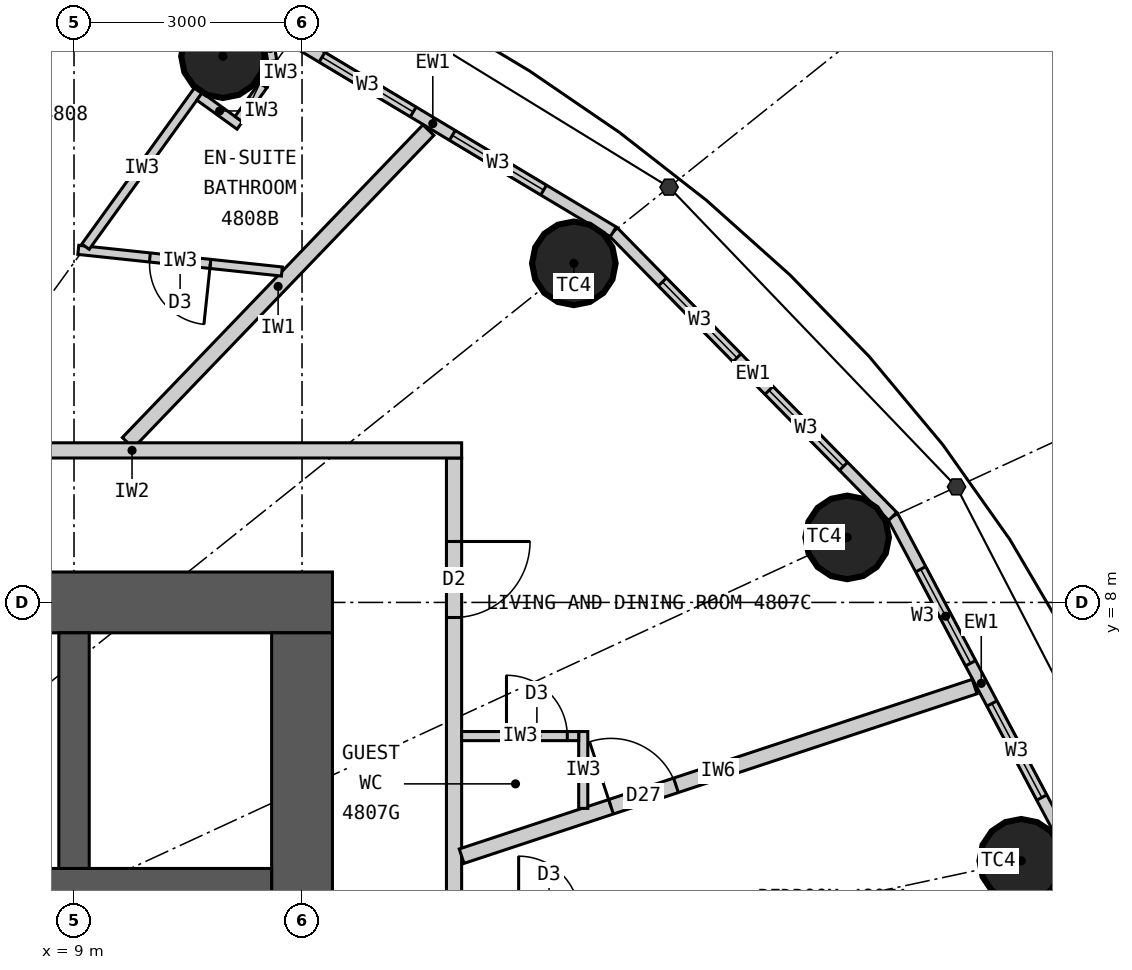
"""IFC4 building model, lengths in metres.
Left out: names, types, materials, properties, quantities, classifications, styles, units other than length and angle.
Written with IfcOpenShell. Run it as: python <this file> out.ifc"""

import sys

from ifc_helpers import new_model, si_unit, direction, frame, frame_2d, origin, origin_2d, place, context, subcontext, project, spatial, rectangle, circle, extrude, element, fill, save


model = new_model("IFC4")
c1 = context("Model", 3, precision=1e-05, world=origin(), true_north=direction((0.0, 1.0)))
c2 = subcontext(c1, "Body", "Model", "MODEL_VIEW")
j1 = project(units=[si_unit("LENGTHUNIT", "METRE"), si_unit("PLANEANGLEUNIT", "RADIAN")], contexts=[c1])
p1 = place(None, origin())
s1 = spatial("IfcSite", under=j1, at=p1, CompositionType="ELEMENT")
p2 = place(p1, origin())
s2 = spatial("IfcBuilding", under=s1, at=p2, CompositionType="ELEMENT")
p3 = place(p2, frame((0.0, 0.0, 179.7)))
s3 = spatial("IfcBuildingStorey", under=s2, at=p3, CompositionType="ELEMENT", Elevation=179.7)
for number, where, z_axis, x_axis in (
    (1, (21.463, 4.601, 0.0), (0.0, 0.0, 1.0), (1.0, 0.0, 0.0)),
    (2, (19.172, 8.855, 0.0), (0.0, 0.0, 1.0), (1.0, 0.0, 0.0)),
    (3, (15.576, 12.461, 0.0), (0.0, 0.0, 1.0), (1.0, 0.0, 0.0)),
    (4, (10.96, 15.186, 0.0), (0.0, 0.0, 1.0), (1.0, 0.0, 0.0)),
):
    element("IfcColumn", number, at=place(p3, frame(where, z_axis=z_axis, x_axis=x_axis)), inside=s3, PredefinedType="COLUMN", context=c2, shape_type="SweptSolid", body=[
        extrude(circle(Radius=0.55, at=origin_2d()), origin(), (0.0, 0.0, 1.0), 3.3),
    ])
p4 = place(p3, frame((-12.4, 8.0, 0.0), z_axis=(0.0, 0.0, 1.0), x_axis=(1.0, 0.0, 0.0)))
e5 = element("IfcWall", 5, at=p4, inside=s3, PredefinedType="SHEAR", context=c2, shape_type="SweptSolid", body=[
    extrude(rectangle(XDim=24.8, YDim=0.8, at=frame_2d((12.4, 0.0))), origin(), (0.0, 0.0, 1.0), 3.3),
])
p5 = place(p4, frame((11.1, 0.0, 0.0)))
e6 = element("IfcOpeningElement", 6, at=p5, cuts=e5, PredefinedType="OPENING", context=c2, shape_type="SweptSolid", body=[
    extrude(rectangle(XDim=1.2, YDim=2.2, at=frame_2d((0.6, 1.1))), frame((0.0, 0.41, 0.0), z_axis=(0.0, -1.0, 0.0), x_axis=(1.0, 0.0, 0.0)), (0.0, 0.0, 1.0), 0.82),
])
p6 = place(p4, frame((18.7, 0.0, 0.0)))
e7 = element("IfcOpeningElement", 7, at=p6, cuts=e5, PredefinedType="OPENING", context=c2, shape_type="SweptSolid", body=[
    extrude(rectangle(XDim=0.9, YDim=2.2, at=frame_2d((0.45, 1.1))), frame((0.0, 0.41, 0.0), z_axis=(0.0, -1.0, 0.0), x_axis=(1.0, 0.0, 0.0)), (0.0, 0.0, 1.0), 0.82),
])
p7 = place(p3, frame((12.0, -7.6, 0.0), z_axis=(0.0, 0.0, 1.0), x_axis=(0.0, 1.0, 0.0)))
e8 = element("IfcWall", 8, at=p7, inside=s3, PredefinedType="SHEAR", context=c2, shape_type="SweptSolid", body=[
    extrude(rectangle(XDim=15.2, YDim=0.8, at=frame_2d((7.6, 0.0))), origin(), (0.0, 0.0, 1.0), 3.3),
])
p8 = place(p7, frame((6.7, 0.0, 0.0)))
e9 = element("IfcOpeningElement", 9, at=p8, cuts=e8, PredefinedType="OPENING", context=c2, shape_type="SweptSolid", body=[
    extrude(rectangle(XDim=1.8, YDim=2.2, at=frame_2d((0.9, 1.1))), frame((0.0, 0.41, 0.0), z_axis=(0.0, -1.0, 0.0), x_axis=(1.0, 0.0, 0.0)), (0.0, 0.0, 1.0), 0.82),
])
p9 = place(p3, frame((-11.6, 4.3, 0.0), z_axis=(0.0, 0.0, 1.0), x_axis=(1.0, 0.0, 0.0)))
e10 = element("IfcWall", 10, at=p9, inside=s3, PredefinedType="SHEAR", context=c2, shape_type="SweptSolid", body=[
    extrude(rectangle(XDim=23.2, YDim=0.4, at=frame_2d((11.6, 0.0))), origin(), (0.0, 0.0, 1.0), 3.3),
])
p10 = place(p3, frame((9.0, 4.5, 0.0), z_axis=(0.0, 0.0, 1.0), x_axis=(0.0, 1.0, 0.0)))
e11 = element("IfcWall", 11, at=p10, inside=s3, PredefinedType="SHEAR", context=c2, shape_type="SweptSolid", body=[
    extrude(rectangle(XDim=3.1, YDim=0.4, at=frame_2d((1.55, 0.0))), origin(), (0.0, 0.0, 1.0), 3.3),
])
p11 = place(p3, frame((22.102, 4.738, 0.0), z_axis=(0.0, 0.0, 1.0), x_axis=(-0.468428906714, 0.883501193748, 0.0)))
e12 = element("IfcWall", 12, at=p11, inside=s3, PredefinedType="ELEMENTEDWALL", context=c2, shape_type="SweptSolid", body=[
    extrude(rectangle(XDim=4.974, YDim=0.15, at=frame_2d((2.487, 0.0))), origin(), (0.0, 0.0, 1.0), 3.12),
])
p12 = place(p11, frame((0.787, 0.0, 0.9)))
e13 = element("IfcOpeningElement", 13, at=p12, cuts=e12, PredefinedType="OPENING", context=c2, shape_type="SweptSolid", body=[
    extrude(rectangle(XDim=1.4, YDim=1.9, at=frame_2d((0.7, 0.95))), frame((0.0, 0.085, 0.0), z_axis=(0.0, -1.0, 0.0), x_axis=(1.0, 0.0, 0.0)), (0.0, 0.0, 1.0), 0.17),
])
p13 = place(p11, frame((2.787, 0.0, 0.9)))
e14 = element("IfcOpeningElement", 14, at=p13, cuts=e12, PredefinedType="OPENING", context=c2, shape_type="SweptSolid", body=[
    extrude(rectangle(XDim=1.4, YDim=1.9, at=frame_2d((0.7, 0.95))), frame((0.0, 0.085, 0.0), z_axis=(0.0, -1.0, 0.0), x_axis=(1.0, 0.0, 0.0)), (0.0, 0.0, 1.0), 0.17),
])
p14 = place(p3, frame((19.772, 9.132, 0.0), z_axis=(0.0, 0.0, 1.0), x_axis=(-0.700727467776, 0.71342905457, 0.0)))
e15 = element("IfcWall", 15, at=p14, inside=s3, PredefinedType="ELEMENTEDWALL", context=c2, shape_type="SweptSolid", body=[
    extrude(rectangle(XDim=5.247, YDim=0.15, at=frame_2d((2.624, 0.0))), origin(), (0.0, 0.0, 1.0), 3.12),
])
p15 = place(p14, frame((0.924, 0.0, 0.9)))
e16 = element("IfcOpeningElement", 16, at=p15, cuts=e15, PredefinedType="OPENING", context=c2, shape_type="SweptSolid", body=[
    extrude(rectangle(XDim=1.4, YDim=1.9, at=frame_2d((0.7, 0.95))), frame((0.0, 0.085, 0.0), z_axis=(0.0, -1.0, 0.0), x_axis=(1.0, 0.0, 0.0)), (0.0, 0.0, 1.0), 0.17),
])
p16 = place(p14, frame((2.924, 0.0, 0.9)))
e17 = element("IfcOpeningElement", 17, at=p16, cuts=e15, PredefinedType="OPENING", context=c2, shape_type="SweptSolid", body=[
    extrude(rectangle(XDim=1.4, YDim=1.9, at=frame_2d((0.7, 0.95))), frame((0.0, 0.085, 0.0), z_axis=(0.0, -1.0, 0.0), x_axis=(1.0, 0.0, 0.0)), (0.0, 0.0, 1.0), 0.17),
])
p17 = place(p3, frame((16.095, 12.876, 0.0), z_axis=(0.0, 0.0, 1.0), x_axis=(-0.857695199231, 0.514158482587, 0.0)))
e18 = element("IfcWall", 18, at=p17, inside=s3, PredefinedType="ELEMENTEDWALL", context=c2, shape_type="SweptSolid", body=[
    extrude(rectangle(XDim=5.536, YDim=0.15, at=frame_2d((2.768, 0.0))), origin(), (0.0, 0.0, 1.0), 3.12),
])
p18 = place(p17, frame((1.068, 0.0, 0.9)))
e19 = element("IfcOpeningElement", 19, at=p18, cuts=e18, PredefinedType="OPENING", context=c2, shape_type="SweptSolid", body=[
    extrude(rectangle(XDim=1.4, YDim=1.9, at=frame_2d((0.7, 0.95))), frame((0.0, 0.085, 0.0), z_axis=(0.0, -1.0, 0.0), x_axis=(1.0, 0.0, 0.0)), (0.0, 0.0, 1.0), 0.17),
])
p19 = place(p17, frame((3.068, 0.0, 0.9)))
e20 = element("IfcOpeningElement", 20, at=p19, cuts=e18, PredefinedType="OPENING", context=c2, shape_type="SweptSolid", body=[
    extrude(rectangle(XDim=1.4, YDim=1.9, at=frame_2d((0.7, 0.95))), frame((0.0, 0.085, 0.0), z_axis=(0.0, -1.0, 0.0), x_axis=(1.0, 0.0, 0.0)), (0.0, 0.0, 1.0), 0.17),
])
p20 = place(p3, frame((14.0, -9.9, 0.0), z_axis=(0.0, 0.0, 1.0), x_axis=(0.0, 1.0, 0.0)))
e21 = element("IfcWall", 21, at=p20, inside=s3, PredefinedType="PARTITIONING", context=c2, shape_type="SweptSolid", body=[
    extrude(rectangle(XDim=19.8, YDim=0.2, at=frame_2d((9.9, 0.0))), origin(), (0.0, 0.0, 1.0), 3.12),
])
p21 = place(p20, frame((4.268, 0.0, 0.0)))
e22 = element("IfcOpeningElement", 22, at=p21, cuts=e21, PredefinedType="OPENING", context=c2, shape_type="SweptSolid", body=[
    extrude(rectangle(XDim=1.0, YDim=2.2, at=frame_2d((0.5, 1.1))), frame((0.0, 0.11, 0.0), z_axis=(0.0, -1.0, 0.0), x_axis=(1.0, 0.0, 0.0)), (0.0, 0.0, 1.0), 0.22),
])
p22 = place(p20, frame((7.177, 0.0, 0.0)))
e23 = element("IfcOpeningElement", 23, at=p22, cuts=e21, PredefinedType="OPENING", context=c2, shape_type="SweptSolid", body=[
    extrude(rectangle(XDim=1.0, YDim=2.2, at=frame_2d((0.5, 1.1))), frame((0.0, 0.11, 0.0), z_axis=(0.0, -1.0, 0.0), x_axis=(1.0, 0.0, 0.0)), (0.0, 0.0, 1.0), 0.22),
])
p23 = place(p20, frame((17.701, 0.0, 0.0)))
e24 = element("IfcOpeningElement", 24, at=p23, cuts=e21, PredefinedType="OPENING", context=c2, shape_type="SweptSolid", body=[
    extrude(rectangle(XDim=1.0, YDim=2.2, at=frame_2d((0.5, 1.1))), frame((0.0, 0.11, 0.0), z_axis=(0.0, -1.0, 0.0), x_axis=(1.0, 0.0, 0.0)), (0.0, 0.0, 1.0), 0.22),
])
p24 = place(p3, frame((14.1, 4.661, 0.0), z_axis=(0.0, 0.0, 1.0), x_axis=(0.949453216399, 0.313908569285, 0.0)))
e25 = element("IfcWall", 25, at=p24, inside=s3, PredefinedType="PARTITIONING", context=c2, shape_type="SweptSolid", body=[
    extrude(rectangle(XDim=7.109, YDim=0.2, at=frame_2d((3.554, 0.0))), origin(), (0.0, 0.0, 1.0), 3.12),
])
p25 = place(p24, frame((2.07, 0.0, 0.0)))
e26 = element("IfcOpeningElement", 26, at=p25, cuts=e25, PredefinedType="OPENING", context=c2, shape_type="SweptSolid", body=[
    extrude(rectangle(XDim=0.9, YDim=2.1, at=frame_2d((0.45, 1.05))), frame((0.0, 0.11, 0.0), z_axis=(0.0, -1.0, 0.0), x_axis=(1.0, 0.0, 0.0)), (0.0, 0.0, 1.0), 0.22),
])
p26 = place(p3, frame((9.708, 10.1, 0.0), z_axis=(0.0, 0.0, 1.0), x_axis=(0.692978748441, 0.720958011405, 0.0)))
e27 = element("IfcWall", 27, at=p26, inside=s3, PredefinedType="PARTITIONING", context=c2, shape_type="SweptSolid", body=[
    extrude(rectangle(XDim=5.707, YDim=0.2, at=frame_2d((2.853, 0.0))), origin(), (0.0, 0.0, 1.0), 3.12),
])
p27 = place(p3, frame((15.7, 5.291, 0.0), z_axis=(0.0, 0.0, 1.0), x_axis=(0.0, 1.0, 0.0)))
e28 = element("IfcWall", 28, at=p27, inside=s3, PredefinedType="PARTITIONING", context=c2, shape_type="SweptSolid", body=[
    extrude(rectangle(XDim=1.011, YDim=0.12, at=frame_2d((0.505, 0.0))), origin(), (0.0, 0.0, 1.0), 3.12),
])
p28 = place(p3, frame((14.1, 6.241, 0.0), z_axis=(0.0, 0.0, 1.0), x_axis=(1.0, 0.0, 0.0)))
e29 = element("IfcWall", 29, at=p28, inside=s3, PredefinedType="PARTITIONING", context=c2, shape_type="SweptSolid", body=[
    extrude(rectangle(XDim=1.54, YDim=0.12, at=frame_2d((0.77, 0.0))), origin(), (0.0, 0.0, 1.0), 3.12),
])
p29 = place(p28, frame((0.59, 0.0, 0.0)))
e30 = element("IfcOpeningElement", 30, at=p29, cuts=e29, PredefinedType="OPENING", context=c2, shape_type="SweptSolid", body=[
    extrude(rectangle(XDim=0.8, YDim=2.1, at=frame_2d((0.4, 1.05))), frame((0.0, 0.07, 0.0), z_axis=(0.0, -1.0, 0.0), x_axis=(1.0, 0.0, 0.0)), (0.0, 0.0, 1.0), 0.14),
])
p30 = place(p3, frame((11.735, 12.353, 0.0), z_axis=(0.0, 0.0, 1.0), x_axis=(-0.994390130276, 0.105774613256, 0.0)))
e31 = element("IfcWall", 31, at=p30, inside=s3, PredefinedType="PARTITIONING", context=c2, shape_type="SweptSolid", body=[
    extrude(rectangle(XDim=2.694, YDim=0.12, at=frame_2d((1.347, 0.0))), origin(), (0.0, 0.0, 1.0), 3.12),
])
p31 = place(p30, frame((0.947, 0.0, 0.0)))
e32 = element("IfcOpeningElement", 32, at=p31, cuts=e31, PredefinedType="OPENING", context=c2, shape_type="SweptSolid", body=[
    extrude(rectangle(XDim=0.8, YDim=2.1, at=frame_2d((0.4, 1.05))), frame((0.0, 0.07, 0.0), z_axis=(0.0, -1.0, 0.0), x_axis=(1.0, 0.0, 0.0)), (0.0, 0.0, 1.0), 0.14),
])
p32 = place(p3, frame((9.151, 12.681, 0.0), z_axis=(0.0, 0.0, 1.0), x_axis=(0.585258912334, 0.8108464747, 0.0)))
e33 = element("IfcWall", 33, at=p32, inside=s3, PredefinedType="PARTITIONING", context=c2, shape_type="SweptSolid", body=[
    extrude(rectangle(XDim=2.54, YDim=0.12, at=frame_2d((1.27, 0.0))), origin(), (0.0, 0.0, 1.0), 2.27),
])
p33 = place(p3, frame((10.651, 14.656, 0.0), z_axis=(0.0, 0.0, 1.0), x_axis=(0.810916094797, -0.585162445137, 0.0)))
e34 = element("IfcWall", 34, at=p33, inside=s3, PredefinedType="PARTITIONING", context=c2, shape_type="SweptSolid", body=[
    extrude(rectangle(XDim=0.652, YDim=0.12, at=frame_2d((0.326, 0.0))), origin(), (0.0, 0.0, 1.0), 3.12),
])
p34 = place(p3, frame((11.167, 14.359, 0.0), z_axis=(0.0, 0.0, 1.0), x_axis=(0.585263549799, 0.810843127415, 0.0)))
e35 = element("IfcWall", 35, at=p34, inside=s3, PredefinedType="PARTITIONING", context=c2, shape_type="SweptSolid", body=[
    extrude(rectangle(XDim=0.55, YDim=0.12, at=frame_2d((0.275, 0.0))), origin(), (0.0, 0.0, 1.0), 3.12),
])
for number, where, z_axis, x_axis in (
    (36, (11.489, 14.804, 0.0), (0.0, 0.0, 1.0), (0.356, 0.935, 0.0)),
    (37, (11.609, 15.12, 0.0), (0.0, 0.0, 1.0), (-0.16, 0.987, 0.0)),
):
    element("IfcWall", number, at=place(p3, frame(where, z_axis=z_axis, x_axis=x_axis)), inside=s3, PredefinedType="PARTITIONING", context=c2, shape_type="SweptSolid", body=[
        extrude(rectangle(XDim=0.338, YDim=0.12, at=frame_2d((0.169, 0.0))), origin(), (0.0, 0.0, 1.0), 3.12),
    ])
p35 = place(p3, frame((5.427, 10.0, 0.0), z_axis=(0.0, 0.0, 1.0), x_axis=(1.0, 0.0, 0.0)))
e38 = element("IfcWall", 38, at=p35, inside=s3, PredefinedType="PARTITIONING", context=c2, shape_type="SweptSolid", body=[
    extrude(rectangle(XDim=8.673, YDim=0.2, at=frame_2d((4.337, 0.0))), origin(), (0.0, 0.0, 1.0), 3.12),
])
p36 = place(p35, frame((0.1, 0.0, 0.0)))
e39 = element("IfcOpeningElement", 39, at=p36, cuts=e38, PredefinedType="OPENING", context=c2, shape_type="SweptSolid", body=[
    extrude(rectangle(XDim=1.0, YDim=2.2, at=frame_2d((0.5, 1.1))), frame((0.0, 0.11, 0.0), z_axis=(0.0, -1.0, 0.0), x_axis=(1.0, 0.0, 0.0)), (0.0, 0.0, 1.0), 0.22),
])
p37 = place(p12, origin())
e40 = element("IfcWindow", 40, at=p37, inside=s3, PartitioningType="SINGLE_PANEL", PredefinedType="WINDOW", context=c2, shape_type="SweptSolid", body=[
    extrude(rectangle(XDim=1.4, YDim=1.9, at=frame_2d((0.7, 0.95))), frame((0.0, 0.03, 0.0), z_axis=(0.0, -1.0, 0.0), x_axis=(1.0, 0.0, 0.0)), (0.0, 0.0, 1.0), 0.06),
])
fill(e13, e40)
p38 = place(p13, origin())
e41 = element("IfcWindow", 41, at=p38, inside=s3, PartitioningType="SINGLE_PANEL", PredefinedType="WINDOW", context=c2, shape_type="SweptSolid", body=[
    extrude(rectangle(XDim=1.4, YDim=1.9, at=frame_2d((0.7, 0.95))), frame((0.0, 0.03, 0.0), z_axis=(0.0, -1.0, 0.0), x_axis=(1.0, 0.0, 0.0)), (0.0, 0.0, 1.0), 0.06),
])
fill(e14, e41)
p39 = place(p15, origin())
e42 = element("IfcWindow", 42, at=p39, inside=s3, PartitioningType="SINGLE_PANEL", PredefinedType="WINDOW", context=c2, shape_type="SweptSolid", body=[
    extrude(rectangle(XDim=1.4, YDim=1.9, at=frame_2d((0.7, 0.95))), frame((0.0, 0.03, 0.0), z_axis=(0.0, -1.0, 0.0), x_axis=(1.0, 0.0, 0.0)), (0.0, 0.0, 1.0), 0.06),
])
fill(e16, e42)
p40 = place(p16, origin())
e43 = element("IfcWindow", 43, at=p40, inside=s3, PartitioningType="SINGLE_PANEL", PredefinedType="WINDOW", context=c2, shape_type="SweptSolid", body=[
    extrude(rectangle(XDim=1.4, YDim=1.9, at=frame_2d((0.7, 0.95))), frame((0.0, 0.03, 0.0), z_axis=(0.0, -1.0, 0.0), x_axis=(1.0, 0.0, 0.0)), (0.0, 0.0, 1.0), 0.06),
])
fill(e17, e43)
p41 = place(p18, origin())
e44 = element("IfcWindow", 44, at=p41, inside=s3, PartitioningType="SINGLE_PANEL", PredefinedType="WINDOW", context=c2, shape_type="SweptSolid", body=[
    extrude(rectangle(XDim=1.4, YDim=1.9, at=frame_2d((0.7, 0.95))), frame((0.0, 0.03, 0.0), z_axis=(0.0, -1.0, 0.0), x_axis=(1.0, 0.0, 0.0)), (0.0, 0.0, 1.0), 0.06),
])
fill(e19, e44)
p42 = place(p19, origin())
e45 = element("IfcWindow", 45, at=p42, inside=s3, PartitioningType="SINGLE_PANEL", PredefinedType="WINDOW", context=c2, shape_type="SweptSolid", body=[
    extrude(rectangle(XDim=1.4, YDim=1.9, at=frame_2d((0.7, 0.95))), frame((0.0, 0.03, 0.0), z_axis=(0.0, -1.0, 0.0), x_axis=(1.0, 0.0, 0.0)), (0.0, 0.0, 1.0), 0.06),
])
fill(e20, e45)
p43 = place(p29, origin())
e46 = element("IfcDoor", 46, at=p43, inside=s3, OperationType="SINGLE_SWING_LEFT", PredefinedType="DOOR", context=c2, shape_type="SweptSolid", body=[
    extrude(rectangle(XDim=0.8, YDim=2.1, at=frame_2d((0.4, 1.05))), frame((0.0, 0.025, 0.0), z_axis=(0.0, -1.0, 0.0), x_axis=(1.0, 0.0, 0.0)), (0.0, 0.0, 1.0), 0.05),
])
fill(e30, e46)
p44 = place(p23, origin())
e47 = element("IfcDoor", 47, at=p44, inside=s3, OperationType="SINGLE_SWING_RIGHT", PredefinedType="DOOR", context=c2, shape_type="SweptSolid", body=[
    extrude(rectangle(XDim=1.0, YDim=2.2, at=frame_2d((0.5, 1.1))), frame((0.0, 0.025, 0.0), z_axis=(0.0, -1.0, 0.0), x_axis=(1.0, 0.0, 0.0)), (0.0, 0.0, 1.0), 0.05),
])
fill(e24, e47)
p45 = place(p25, origin())
e48 = element("IfcDoor", 48, at=p45, inside=s3, OperationType="SINGLE_SWING_LEFT", PredefinedType="DOOR", context=c2, shape_type="SweptSolid", body=[
    extrude(rectangle(XDim=0.9, YDim=2.1, at=frame_2d((0.45, 1.05))), frame((0.0, 0.025, 0.0), z_axis=(0.0, -1.0, 0.0), x_axis=(1.0, 0.0, 0.0)), (0.0, 0.0, 1.0), 0.05),
])
fill(e26, e48)
p46 = place(p31, origin())
e49 = element("IfcDoor", 49, at=p46, inside=s3, OperationType="SINGLE_SWING_LEFT", PredefinedType="DOOR", context=c2, shape_type="SweptSolid", body=[
    extrude(rectangle(XDim=0.8, YDim=2.1, at=frame_2d((0.4, 1.05))), frame((0.0, 0.025, 0.0), z_axis=(0.0, -1.0, 0.0), x_axis=(1.0, 0.0, 0.0)), (0.0, 0.0, 1.0), 0.05),
])
fill(e32, e49)
save(model, sys.argv[1])
